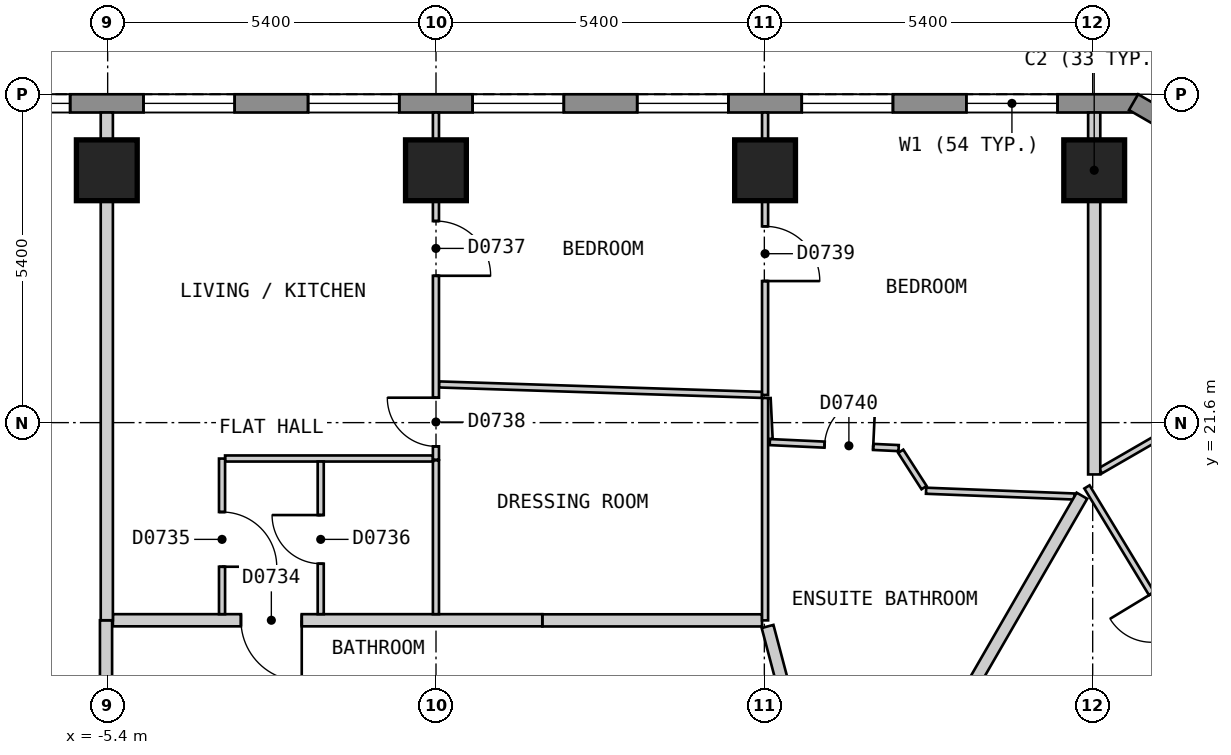
"""IFC4 building model, lengths in metres.
Left out: names, types, materials, properties, quantities, classifications, styles, units other than length and angle.
Written with IfcOpenShell. Run it as: python <this file> out.ifc"""

import sys

from ifc_helpers import new_model, si_unit, direction, frame, frame_2d, origin, origin_2d, place, context, subcontext, project, spatial, polyline, rectangle, outline, extrude, element, fill, save


model = new_model("IFC4")
c1 = context("Model", 3, precision=1e-05, world=origin(), true_north=direction((0.0, 1.0)))
c2 = subcontext(c1, "Body", "Model", "MODEL_VIEW")
j1 = project(units=[si_unit("LENGTHUNIT", "METRE"), si_unit("PLANEANGLEUNIT", "RADIAN")], contexts=[c1])
p1 = place(None, origin())
s1 = spatial("IfcSite", under=j1, at=p1, CompositionType="ELEMENT")
p2 = place(p1, origin())
s2 = spatial("IfcBuilding", under=s1, at=p2, CompositionType="ELEMENT")
p3 = place(p2, frame((0.0, 0.0, 99.0)))
s3 = spatial("IfcBuildingStorey", under=s2, at=p3, CompositionType="ELEMENT", Elevation=99.0)
for number, where, z_axis, x_axis in (
    (1, (10.825, 25.75, 0.0), (0.0, 0.0, 1.0), (-1.0, 0.0, 0.0)),
    (2, (5.412, 25.75, 0.0), (0.0, 0.0, 1.0), (-1.0, 0.0, 0.0)),
    (3, (-0.001, 25.75, 0.0), (0.0, 0.0, 1.0), (-1.0, 0.0, 0.0)),
    (4, (-5.414, 25.75, 0.0), (0.0, 0.0, 1.0), (-1.0, 0.0, 0.0)),
):
    element("IfcColumn", number, at=place(p3, frame(where, z_axis=z_axis, x_axis=x_axis)), inside=s3, PredefinedType="COLUMN", context=c2, shape_type="SweptSolid", body=[
        extrude(rectangle(XDim=1.0, YDim=1.0, at=origin_2d()), origin(), (0.0, 0.0, 1.0), 3.0),
    ])
p4 = place(p3, frame((11.547, 26.85, 0.0), z_axis=(0.0, 0.0, 1.0), x_axis=(-1.0, 0.0, 0.0)))
e5 = element("IfcWall", 5, at=p4, inside=s3, PredefinedType="SOLIDWALL", context=c2, shape_type="SweptSolid", body=[
    extrude(outline(polyline([(0.0, -0.15), (23.094, -0.15), (23.014, 0.15), (0.08, 0.15), (0.0, -0.15)])), origin(), (0.0, 0.0, 1.0), 2.7),
])
p5 = place(p4, frame((1.325, 0.0, 0.15)))
e6 = element("IfcOpeningElement", 6, at=p5, cuts=e5, PredefinedType="OPENING", context=c2, shape_type="SweptSolid", body=[
    extrude(rectangle(XDim=1.5, YDim=2.1, at=frame_2d((0.75, 1.05))), frame((0.0, 0.16, 0.0), z_axis=(0.0, -1.0, 0.0), x_axis=(1.0, 0.0, 0.0)), (0.0, 0.0, 1.0), 0.32),
])
p6 = place(p4, frame((4.032, 0.0, 0.15)))
e7 = element("IfcOpeningElement", 7, at=p6, cuts=e5, PredefinedType="OPENING", context=c2, shape_type="SweptSolid", body=[
    extrude(rectangle(XDim=1.5, YDim=2.1, at=frame_2d((0.75, 1.05))), frame((0.0, 0.16, 0.0), z_axis=(0.0, -1.0, 0.0), x_axis=(1.0, 0.0, 0.0)), (0.0, 0.0, 1.0), 0.32),
])
p7 = place(p4, frame((6.738, 0.0, 0.15)))
e8 = element("IfcOpeningElement", 8, at=p7, cuts=e5, PredefinedType="OPENING", context=c2, shape_type="SweptSolid", body=[
    extrude(rectangle(XDim=1.5, YDim=2.1, at=frame_2d((0.75, 1.05))), frame((0.0, 0.16, 0.0), z_axis=(0.0, -1.0, 0.0), x_axis=(1.0, 0.0, 0.0)), (0.0, 0.0, 1.0), 0.32),
])
p8 = place(p4, frame((9.445, 0.0, 0.15)))
e9 = element("IfcOpeningElement", 9, at=p8, cuts=e5, PredefinedType="OPENING", context=c2, shape_type="SweptSolid", body=[
    extrude(rectangle(XDim=1.5, YDim=2.1, at=frame_2d((0.75, 1.05))), frame((0.0, 0.16, 0.0), z_axis=(0.0, -1.0, 0.0), x_axis=(1.0, 0.0, 0.0)), (0.0, 0.0, 1.0), 0.32),
])
p9 = place(p4, frame((12.151, 0.0, 0.15)))
e10 = element("IfcOpeningElement", 10, at=p9, cuts=e5, PredefinedType="OPENING", context=c2, shape_type="SweptSolid", body=[
    extrude(rectangle(XDim=1.5, YDim=2.1, at=frame_2d((0.75, 1.05))), frame((0.0, 0.16, 0.0), z_axis=(0.0, -1.0, 0.0), x_axis=(1.0, 0.0, 0.0)), (0.0, 0.0, 1.0), 0.32),
])
p10 = place(p4, frame((14.858, 0.0, 0.15)))
e11 = element("IfcOpeningElement", 11, at=p10, cuts=e5, PredefinedType="OPENING", context=c2, shape_type="SweptSolid", body=[
    extrude(rectangle(XDim=1.5, YDim=2.1, at=frame_2d((0.75, 1.05))), frame((0.0, 0.16, 0.0), z_axis=(0.0, -1.0, 0.0), x_axis=(1.0, 0.0, 0.0)), (0.0, 0.0, 1.0), 0.32),
])
p11 = place(p4, frame((17.564, 0.0, 0.15)))
e12 = element("IfcOpeningElement", 12, at=p11, cuts=e5, PredefinedType="OPENING", context=c2, shape_type="SweptSolid", body=[
    extrude(rectangle(XDim=1.5, YDim=2.1, at=frame_2d((0.75, 1.05))), frame((0.0, 0.16, 0.0), z_axis=(0.0, -1.0, 0.0), x_axis=(1.0, 0.0, 0.0)), (0.0, 0.0, 1.0), 0.32),
])
p12 = place(p4, frame((20.271, 0.0, 0.15)))
e13 = element("IfcOpeningElement", 13, at=p12, cuts=e5, PredefinedType="OPENING", context=c2, shape_type="SweptSolid", body=[
    extrude(rectangle(XDim=1.5, YDim=2.1, at=frame_2d((0.75, 1.05))), frame((0.0, 0.16, 0.0), z_axis=(0.0, -1.0, 0.0), x_axis=(1.0, 0.0, 0.0)), (0.0, 0.0, 1.0), 0.32),
])
p13 = place(p3, frame((15.802, 24.37, 0.0), z_axis=(0.0, 0.0, 1.0), x_axis=(-0.866022959057, 0.500004234368, 0.0)))
e14 = element("IfcWall", 14, at=p13, inside=s3, PredefinedType="SOLIDWALL", context=c2, shape_type="SweptSolid", body=[
    extrude(outline(polyline([(0.0, -0.15), (5.0, -0.15), (4.92, 0.15), (0.08, 0.15), (0.0, -0.15)])), origin(), (0.0, 0.0, 1.0), 2.7),
])
p14 = place(p13, frame((0.65, 0.0, 0.15)))
e15 = element("IfcOpeningElement", 15, at=p14, cuts=e14, PredefinedType="OPENING", context=c2, shape_type="SweptSolid", body=[
    extrude(rectangle(XDim=1.2, YDim=2.1, at=frame_2d((0.6, 1.05))), frame((0.0, 0.16, 0.0), z_axis=(0.0, -1.0, 0.0), x_axis=(1.0, 0.0, 0.0)), (0.0, 0.0, 1.0), 0.32),
])
p15 = place(p13, frame((3.15, 0.0, 0.15)))
e16 = element("IfcOpeningElement", 16, at=p15, cuts=e14, PredefinedType="OPENING", context=c2, shape_type="SweptSolid", body=[
    extrude(rectangle(XDim=1.2, YDim=2.1, at=frame_2d((0.6, 1.05))), frame((0.0, 0.16, 0.0), z_axis=(0.0, -1.0, 0.0), x_axis=(1.0, 0.0, 0.0)), (0.0, 0.0, 1.0), 0.32),
])
p16 = place(p3, frame((5.453, 18.248, 0.0), z_axis=(0.0, 0.0, 1.0), x_axis=(0.255687088482, -0.9667595941, 0.0)))
e17 = element("IfcWall", 17, at=p16, inside=s3, PredefinedType="PARTITIONING", context=c2, shape_type="SweptSolid", body=[
    extrude(rectangle(XDim=1.6, YDim=0.2, at=frame_2d((0.8, 0.0))), origin(), (0.0, 0.0, 1.0), 2.7),
])
p17 = place(p3, frame((1.75, 18.348, 0.0), z_axis=(0.0, 0.0, 1.0), x_axis=(1.0, 0.0, 0.0)))
e18 = element("IfcWall", 18, at=p17, inside=s3, PredefinedType="PARTITIONING", context=c2, shape_type="SweptSolid", body=[
    extrude(rectangle(XDim=3.612, YDim=0.2, at=frame_2d((1.806, 0.0))), origin(), (0.0, 0.0, 1.0), 2.7),
])
p18 = place(p3, frame((-5.314, 18.35, 0.0), z_axis=(0.0, 0.0, 1.0), x_axis=(1.0, 0.0, 0.0)))
e19 = element("IfcWall", 19, at=p18, inside=s3, PredefinedType="PARTITIONING", context=c2, shape_type="SweptSolid", body=[
    extrude(rectangle(XDim=7.062, YDim=0.2, at=frame_2d((3.531, 0.0))), origin(), (0.0, 0.0, 1.0), 2.7),
])
p19 = place(p18, frame((2.106, 0.0, 0.0)))
e20 = element("IfcOpeningElement", 20, at=p19, cuts=e19, PredefinedType="OPENING", context=c2, shape_type="SweptSolid", body=[
    extrude(rectangle(XDim=1.0, YDim=2.1, at=frame_2d((0.5, 1.05))), frame((0.0, 0.11, 0.0), z_axis=(0.0, -1.0, 0.0), x_axis=(1.0, 0.0, 0.0)), (0.0, 0.0, 1.0), 0.22),
])
p20 = place(p3, frame((-5.427, 17.4, 0.0), z_axis=(0.0, 0.0, 1.0), x_axis=(0.0, 1.0, 0.0)))
e21 = element("IfcWall", 21, at=p20, inside=s3, PredefinedType="PARTITIONING", context=c2, shape_type="SweptSolid", body=[
    extrude(rectangle(XDim=0.95, YDim=0.2, at=frame_2d((0.475, 0.0))), origin(), (0.0, 0.0, 1.0), 2.7),
])
p21 = place(p3, frame((7.643, 21.129, 0.0), z_axis=(0.0, 0.0, 1.0), x_axis=(0.540427628168, -0.841390503104, 0.0)))
e22 = element("IfcWall", 22, at=p21, inside=s3, PredefinedType="PARTITIONING", context=c2, shape_type="SweptSolid", body=[
    extrude(rectangle(XDim=0.711, YDim=0.1, at=frame_2d((0.355, 0.0))), origin(), (0.0, 0.0, 1.0), 2.7),
])
p22 = place(p3, frame((10.706, 20.543, 0.0), z_axis=(0.0, 0.0, 1.0), x_axis=(0.518240414093, -0.855234981278, 0.0)))
e23 = element("IfcWall", 23, at=p22, inside=s3, PredefinedType="PARTITIONING", context=c2, shape_type="SweptSolid", body=[
    extrude(rectangle(XDim=4.855, YDim=0.1, at=frame_2d((2.427, 0.0))), origin(), (0.0, 0.0, 1.0), 2.7),
])
p23 = place(p22, frame((2.052, 0.0, 0.0)))
e24 = element("IfcOpeningElement", 24, at=p23, cuts=e23, PredefinedType="OPENING", context=c2, shape_type="SweptSolid", body=[
    extrude(rectangle(XDim=0.8, YDim=2.1, at=frame_2d((0.4, 1.05))), frame((0.0, 0.06, 0.0), z_axis=(0.0, -1.0, 0.0), x_axis=(1.0, 0.0, 0.0)), (0.0, 0.0, 1.0), 0.12),
])
p24 = place(p3, frame((5.454, 22.002, 0.0), z_axis=(0.0, 0.0, 1.0), x_axis=(0.048996315227, -0.998798959298, 0.0)))
e25 = element("IfcWall", 25, at=p24, inside=s3, PredefinedType="PARTITIONING", context=c2, shape_type="SweptSolid", body=[
    extrude(rectangle(XDim=0.673, YDim=0.1, at=frame_2d((0.336, 0.0))), origin(), (0.0, 0.0, 1.0), 2.7),
])
p25 = place(p3, frame((-0.001, 20.98, 0.0), z_axis=(0.0, 0.0, 1.0), x_axis=(0.0, -1.0, 0.0)))
e26 = element("IfcWall", 26, at=p25, inside=s3, PredefinedType="PARTITIONING", context=c2, shape_type="SweptSolid", body=[
    extrude(rectangle(XDim=2.53, YDim=0.1, at=frame_2d((1.265, 0.0))), origin(), (0.0, 0.0, 1.0), 2.7),
])
p26 = place(p3, frame((5.412, 22.005, 0.0), z_axis=(0.0, 0.0, 1.0), x_axis=(0.0, -1.0, 0.0)))
e27 = element("IfcWall", 27, at=p26, inside=s3, PredefinedType="PARTITIONING", context=c2, shape_type="SweptSolid", body=[
    extrude(rectangle(XDim=3.657, YDim=0.1, at=frame_2d((1.829, 0.0))), origin(), (0.0, 0.0, 1.0), 2.7),
])
p27 = place(p3, frame((8.06, 20.48, 0.0), z_axis=(0.0, 0.0, 1.0), x_axis=(0.999243345912, -0.038893902497, 0.0)))
e28 = element("IfcWall", 28, at=p27, inside=s3, PredefinedType="PARTITIONING", context=c2, shape_type="SweptSolid", body=[
    extrude(rectangle(XDim=2.442, YDim=0.1, at=frame_2d((1.221, 0.0))), origin(), (0.0, 0.0, 1.0), 2.7),
])
p28 = place(p3, frame((0.049, 22.228, 0.0), z_axis=(0.0, 0.0, 1.0), x_axis=(0.99947566488, -0.032378933174, 0.0)))
e29 = element("IfcWall", 29, at=p28, inside=s3, PredefinedType="PARTITIONING", context=c2, shape_type="SweptSolid", body=[
    extrude(rectangle(XDim=5.316, YDim=0.1, at=frame_2d((2.658, 0.0))), origin(), (0.0, 0.0, 1.0), 2.7),
])
p29 = place(p3, frame((5.49, 21.28, 0.0), z_axis=(0.0, 0.0, 1.0), x_axis=(0.998907627838, -0.046728482187, 0.0)))
e30 = element("IfcWall", 30, at=p29, inside=s3, PredefinedType="PARTITIONING", context=c2, shape_type="SweptSolid", body=[
    extrude(rectangle(XDim=2.121, YDim=0.1, at=frame_2d((1.061, 0.0))), origin(), (0.0, 0.0, 1.0), 2.7),
])
p30 = place(p29, frame((0.902, 0.0, 0.0)))
e31 = element("IfcOpeningElement", 31, at=p30, cuts=e30, PredefinedType="OPENING", context=c2, shape_type="SweptSolid", body=[
    extrude(rectangle(XDim=0.8, YDim=2.1, at=frame_2d((0.4, 1.05))), frame((0.0, 0.06, 0.0), z_axis=(0.0, -1.0, 0.0), x_axis=(1.0, 0.0, 0.0)), (0.0, 0.0, 1.0), 0.12),
])
p31 = place(p3, frame((-3.469, 21.01, 0.0), z_axis=(0.0, 0.0, 1.0), x_axis=(1.0, 0.0, 0.0)))
e32 = element("IfcWall", 32, at=p31, inside=s3, PredefinedType="PARTITIONING", context=c2, shape_type="SweptSolid", body=[
    extrude(rectangle(XDim=3.418, YDim=0.1, at=frame_2d((1.709, 0.0))), origin(), (0.0, 0.0, 1.0), 2.7),
])
p32 = place(p3, frame((5.412, 22.055, 0.0), z_axis=(0.0, 0.0, 1.0), x_axis=(0.0, 1.0, 0.0)))
e33 = element("IfcWall", 33, at=p32, inside=s3, PredefinedType="PARTITIONING", context=c2, shape_type="SweptSolid", body=[
    extrude(rectangle(XDim=4.645, YDim=0.1, at=frame_2d((2.323, 0.0))), origin(), (0.0, 0.0, 1.0), 2.7),
])
p33 = place(p32, frame((1.873, 0.0, 0.0)))
e34 = element("IfcOpeningElement", 34, at=p33, cuts=e33, PredefinedType="OPENING", context=c2, shape_type="SweptSolid", body=[
    extrude(rectangle(XDim=0.9, YDim=2.1, at=frame_2d((0.45, 1.05))), frame((0.0, 0.06, 0.0), z_axis=(0.0, -1.0, 0.0), x_axis=(1.0, 0.0, 0.0)), (0.0, 0.0, 1.0), 0.12),
])
p34 = place(p3, frame((-0.001, 20.99, 0.0), z_axis=(0.0, 0.0, 1.0), x_axis=(0.0, 1.0, 0.0)))
e35 = element("IfcWall", 35, at=p34, inside=s3, PredefinedType="PARTITIONING", context=c2, shape_type="SweptSolid", body=[
    extrude(rectangle(XDim=5.71, YDim=0.1, at=frame_2d((2.855, 0.0))), origin(), (0.0, 0.0, 1.0), 2.7),
])
p35 = place(p34, frame((3.025, 0.0, 0.0)))
e36 = element("IfcOpeningElement", 36, at=p35, cuts=e35, PredefinedType="OPENING", context=c2, shape_type="SweptSolid", body=[
    extrude(rectangle(XDim=0.9, YDim=2.1, at=frame_2d((0.45, 1.05))), frame((0.0, 0.06, 0.0), z_axis=(0.0, -1.0, 0.0), x_axis=(1.0, 0.0, 0.0)), (0.0, 0.0, 1.0), 0.12),
])
p36 = place(p34, frame((0.22, 0.0, 0.0)))
e37 = element("IfcOpeningElement", 37, at=p36, cuts=e35, PredefinedType="OPENING", context=c2, shape_type="SweptSolid", body=[
    extrude(rectangle(XDim=0.8, YDim=2.1, at=frame_2d((0.4, 1.05))), frame((0.0, 0.06, 0.0), z_axis=(0.0, -1.0, 0.0), x_axis=(1.0, 0.0, 0.0)), (0.0, 0.0, 1.0), 0.12),
])
p37 = place(p3, frame((-3.519, 18.45, 0.0), z_axis=(0.0, 0.0, 1.0), x_axis=(0.0, 1.0, 0.0)))
e38 = element("IfcWall", 38, at=p37, inside=s3, PredefinedType="PARTITIONING", context=c2, shape_type="SweptSolid", body=[
    extrude(rectangle(XDim=2.559, YDim=0.1, at=frame_2d((1.28, 0.0))), origin(), (0.0, 0.0, 1.0), 2.7),
])
p38 = place(p37, frame((0.78, 0.0, 0.0)))
e39 = element("IfcOpeningElement", 39, at=p38, cuts=e38, PredefinedType="OPENING", context=c2, shape_type="SweptSolid", body=[
    extrude(rectangle(XDim=0.9, YDim=2.1, at=frame_2d((0.45, 1.05))), frame((0.0, 0.06, 0.0), z_axis=(0.0, -1.0, 0.0), x_axis=(1.0, 0.0, 0.0)), (0.0, 0.0, 1.0), 0.12),
])
p39 = place(p3, frame((-1.896, 18.45, 0.0), z_axis=(0.0, 0.0, 1.0), x_axis=(0.0, 1.0, 0.0)))
e40 = element("IfcWall", 40, at=p39, inside=s3, PredefinedType="PARTITIONING", context=c2, shape_type="SweptSolid", body=[
    extrude(rectangle(XDim=2.51, YDim=0.1, at=frame_2d((1.255, 0.0))), origin(), (0.0, 0.0, 1.0), 2.7),
])
p40 = place(p39, frame((0.83, 0.0, 0.0)))
e41 = element("IfcOpeningElement", 41, at=p40, cuts=e40, PredefinedType="OPENING", context=c2, shape_type="SweptSolid", body=[
    extrude(rectangle(XDim=0.8, YDim=2.1, at=frame_2d((0.4, 1.05))), frame((0.0, 0.06, 0.0), z_axis=(0.0, -1.0, 0.0), x_axis=(1.0, 0.0, 0.0)), (0.0, 0.0, 1.0), 0.12),
])
p41 = place(p3, frame((9.83, 14.375, 0.0), z_axis=(0.0, 0.0, 1.0), x_axis=(0.866016855193, 0.500014806302, 0.0)))
e42 = element("IfcWall", 42, at=p41, inside=s3, PredefinedType="PARTITIONING", context=c2, shape_type="SweptSolid", body=[
    extrude(rectangle(XDim=10.0, YDim=0.1, at=frame_2d((5.0, 0.0))), origin(), (0.0, 0.0, 1.0), 2.7),
])
p42 = place(p41, frame((6.523, 0.0, 0.0)))
e43 = element("IfcOpeningElement", 43, at=p42, cuts=e42, PredefinedType="OPENING", context=c2, shape_type="SweptSolid", body=[
    extrude(rectangle(XDim=0.9, YDim=2.1, at=frame_2d((0.45, 1.05))), frame((0.0, 0.06, 0.0), z_axis=(0.0, -1.0, 0.0), x_axis=(1.0, 0.0, 0.0)), (0.0, 0.0, 1.0), 0.12),
])
p43 = place(p3, frame((10.926, 20.808, 0.0), z_axis=(0.0, 0.0, 1.0), x_axis=(0.86600925905, 0.500027962457, 0.0)))
e44 = element("IfcWall", 44, at=p43, inside=s3, PredefinedType="PARTITIONING", context=c2, shape_type="SweptSolid", body=[
    extrude(rectangle(XDim=5.834, YDim=0.1, at=frame_2d((2.917, 0.0))), origin(), (0.0, 0.0, 1.0), 2.7),
])
p44 = place(p43, frame((2.409, 0.0, 0.0)))
e45 = element("IfcOpeningElement", 45, at=p44, cuts=e44, PredefinedType="OPENING", context=c2, shape_type="SweptSolid", body=[
    extrude(rectangle(XDim=0.9, YDim=2.1, at=frame_2d((0.45, 1.05))), frame((0.0, 0.06, 0.0), z_axis=(0.0, -1.0, 0.0), x_axis=(1.0, 0.0, 0.0)), (0.0, 0.0, 1.0), 0.12),
])
p45 = place(p3, frame((-5.414, 26.7, 0.0), z_axis=(0.0, 0.0, 1.0), x_axis=(0.0, -1.0, 0.0)))
e46 = element("IfcWall", 46, at=p45, inside=s3, PredefinedType="PARTITIONING", context=c2, shape_type="SweptSolid", body=[
    extrude(rectangle(XDim=8.35, YDim=0.2, at=frame_2d((4.175, 0.0))), origin(), (0.0, 0.0, 1.0), 2.7),
])
p46 = place(p3, frame((8.43, 16.6, 0.0), z_axis=(0.0, 0.0, 1.0), x_axis=(0.500072613115, 0.865983476524, 0.0)))
e47 = element("IfcWall", 47, at=p46, inside=s3, PredefinedType="PARTITIONING", context=c2, shape_type="SweptSolid", body=[
    extrude(rectangle(XDim=4.385, YDim=0.2, at=frame_2d((2.193, 0.0))), origin(), (0.0, 0.0, 1.0), 2.7),
])
p47 = place(p3, frame((10.825, 20.748, 0.0), z_axis=(0.0, 0.0, 1.0), x_axis=(0.0, 1.0, 0.0)))
e48 = element("IfcWall", 48, at=p47, inside=s3, PredefinedType="PARTITIONING", context=c2, shape_type="SweptSolid", body=[
    extrude(rectangle(XDim=5.952, YDim=0.2, at=frame_2d((2.976, 0.0))), origin(), (0.0, 0.0, 1.0), 2.7),
])
p48 = place(p5, origin())
e49 = element("IfcWindow", 49, at=p48, inside=s3, PartitioningType="SINGLE_PANEL", PredefinedType="WINDOW", context=c2, shape_type="SweptSolid", body=[
    extrude(rectangle(XDim=1.5, YDim=2.1, at=frame_2d((0.75, 1.05))), frame((0.0, 0.03, 0.0), z_axis=(0.0, -1.0, 0.0), x_axis=(1.0, 0.0, 0.0)), (0.0, 0.0, 1.0), 0.06),
])
fill(e6, e49)
p49 = place(p6, origin())
e50 = element("IfcWindow", 50, at=p49, inside=s3, PartitioningType="SINGLE_PANEL", PredefinedType="WINDOW", context=c2, shape_type="SweptSolid", body=[
    extrude(rectangle(XDim=1.5, YDim=2.1, at=frame_2d((0.75, 1.05))), frame((0.0, 0.03, 0.0), z_axis=(0.0, -1.0, 0.0), x_axis=(1.0, 0.0, 0.0)), (0.0, 0.0, 1.0), 0.06),
])
fill(e7, e50)
p50 = place(p7, origin())
e51 = element("IfcWindow", 51, at=p50, inside=s3, PartitioningType="SINGLE_PANEL", PredefinedType="WINDOW", context=c2, shape_type="SweptSolid", body=[
    extrude(rectangle(XDim=1.5, YDim=2.1, at=frame_2d((0.75, 1.05))), frame((0.0, 0.03, 0.0), z_axis=(0.0, -1.0, 0.0), x_axis=(1.0, 0.0, 0.0)), (0.0, 0.0, 1.0), 0.06),
])
fill(e8, e51)
p51 = place(p8, origin())
e52 = element("IfcWindow", 52, at=p51, inside=s3, PartitioningType="SINGLE_PANEL", PredefinedType="WINDOW", context=c2, shape_type="SweptSolid", body=[
    extrude(rectangle(XDim=1.5, YDim=2.1, at=frame_2d((0.75, 1.05))), frame((0.0, 0.03, 0.0), z_axis=(0.0, -1.0, 0.0), x_axis=(1.0, 0.0, 0.0)), (0.0, 0.0, 1.0), 0.06),
])
fill(e9, e52)
p52 = place(p9, origin())
e53 = element("IfcWindow", 53, at=p52, inside=s3, PartitioningType="SINGLE_PANEL", PredefinedType="WINDOW", context=c2, shape_type="SweptSolid", body=[
    extrude(rectangle(XDim=1.5, YDim=2.1, at=frame_2d((0.75, 1.05))), frame((0.0, 0.03, 0.0), z_axis=(0.0, -1.0, 0.0), x_axis=(1.0, 0.0, 0.0)), (0.0, 0.0, 1.0), 0.06),
])
fill(e10, e53)
p53 = place(p10, origin())
e54 = element("IfcWindow", 54, at=p53, inside=s3, PartitioningType="SINGLE_PANEL", PredefinedType="WINDOW", context=c2, shape_type="SweptSolid", body=[
    extrude(rectangle(XDim=1.5, YDim=2.1, at=frame_2d((0.75, 1.05))), frame((0.0, 0.03, 0.0), z_axis=(0.0, -1.0, 0.0), x_axis=(1.0, 0.0, 0.0)), (0.0, 0.0, 1.0), 0.06),
])
fill(e11, e54)
p54 = place(p11, origin())
e55 = element("IfcWindow", 55, at=p54, inside=s3, PartitioningType="SINGLE_PANEL", PredefinedType="WINDOW", context=c2, shape_type="SweptSolid", body=[
    extrude(rectangle(XDim=1.5, YDim=2.1, at=frame_2d((0.75, 1.05))), frame((0.0, 0.03, 0.0), z_axis=(0.0, -1.0, 0.0), x_axis=(1.0, 0.0, 0.0)), (0.0, 0.0, 1.0), 0.06),
])
fill(e12, e55)
p55 = place(p23, origin())
e56 = element("IfcDoor", 56, at=p55, inside=s3, OperationType="SINGLE_SWING_LEFT", PredefinedType="DOOR", context=c2, shape_type="SweptSolid", body=[
    extrude(rectangle(XDim=0.8, YDim=2.1, at=frame_2d((0.4, 1.05))), frame((0.0, 0.025, 0.0), z_axis=(0.0, -1.0, 0.0), x_axis=(1.0, 0.0, 0.0)), (0.0, 0.0, 1.0), 0.05),
])
fill(e24, e56)
p56 = place(p19, origin())
e57 = element("IfcDoor", 57, at=p56, inside=s3, OperationType="SINGLE_SWING_RIGHT", PredefinedType="DOOR", context=c2, shape_type="SweptSolid", body=[
    extrude(rectangle(XDim=1.0, YDim=2.1, at=frame_2d((0.5, 1.05))), frame((0.0, 0.025, 0.0), z_axis=(0.0, -1.0, 0.0), x_axis=(1.0, 0.0, 0.0)), (0.0, 0.0, 1.0), 0.05),
])
fill(e20, e57)
p57 = place(p38, origin())
e58 = element("IfcDoor", 58, at=p57, inside=s3, OperationType="SINGLE_SWING_LEFT", PredefinedType="DOOR", context=c2, shape_type="SweptSolid", body=[
    extrude(rectangle(XDim=0.9, YDim=2.1, at=frame_2d((0.45, 1.05))), frame((0.0, 0.025, 0.0), z_axis=(0.0, -1.0, 0.0), x_axis=(1.0, 0.0, 0.0)), (0.0, 0.0, 1.0), 0.05),
])
fill(e39, e58)
p58 = place(p40, origin())
e59 = element("IfcDoor", 59, at=p58, inside=s3, OperationType="SINGLE_SWING_RIGHT", PredefinedType="DOOR", context=c2, shape_type="SweptSolid", body=[
    extrude(rectangle(XDim=0.8, YDim=2.1, at=frame_2d((0.4, 1.05))), frame((0.0, 0.025, 0.0), z_axis=(0.0, -1.0, 0.0), x_axis=(1.0, 0.0, 0.0)), (0.0, 0.0, 1.0), 0.05),
])
fill(e41, e59)
p59 = place(p35, origin())
e60 = element("IfcDoor", 60, at=p59, inside=s3, OperationType="SINGLE_SWING_LEFT", PredefinedType="DOOR", context=c2, shape_type="SweptSolid", body=[
    extrude(rectangle(XDim=0.9, YDim=2.1, at=frame_2d((0.45, 1.05))), frame((0.0, 0.025, 0.0), z_axis=(0.0, -1.0, 0.0), x_axis=(1.0, 0.0, 0.0)), (0.0, 0.0, 1.0), 0.05),
])
fill(e36, e60)
p60 = place(p36, origin())
e61 = element("IfcDoor", 61, at=p60, inside=s3, OperationType="SINGLE_SWING_RIGHT", PredefinedType="DOOR", context=c2, shape_type="SweptSolid", body=[
    extrude(rectangle(XDim=0.8, YDim=2.1, at=frame_2d((0.4, 1.05))), frame((0.0, 0.025, 0.0), z_axis=(0.0, -1.0, 0.0), x_axis=(1.0, 0.0, 0.0)), (0.0, 0.0, 1.0), 0.05),
])
fill(e37, e61)
p61 = place(p33, origin())
e62 = element("IfcDoor", 62, at=p61, inside=s3, OperationType="SINGLE_SWING_LEFT", PredefinedType="DOOR", context=c2, shape_type="SweptSolid", body=[
    extrude(rectangle(XDim=0.9, YDim=2.1, at=frame_2d((0.45, 1.05))), frame((0.0, 0.025, 0.0), z_axis=(0.0, -1.0, 0.0), x_axis=(1.0, 0.0, 0.0)), (0.0, 0.0, 1.0), 0.05),
])
fill(e34, e62)
p62 = place(p30, origin())
e63 = element("IfcDoor", 63, at=p62, inside=s3, OperationType="SINGLE_SWING_RIGHT", PredefinedType="DOOR", context=c2, shape_type="SweptSolid", body=[
    extrude(rectangle(XDim=0.8, YDim=2.1, at=frame_2d((0.4, 1.05))), frame((0.0, 0.025, 0.0), z_axis=(0.0, -1.0, 0.0), x_axis=(1.0, 0.0, 0.0)), (0.0, 0.0, 1.0), 0.05),
])
fill(e31, e63)
save(model, sys.argv[1])
